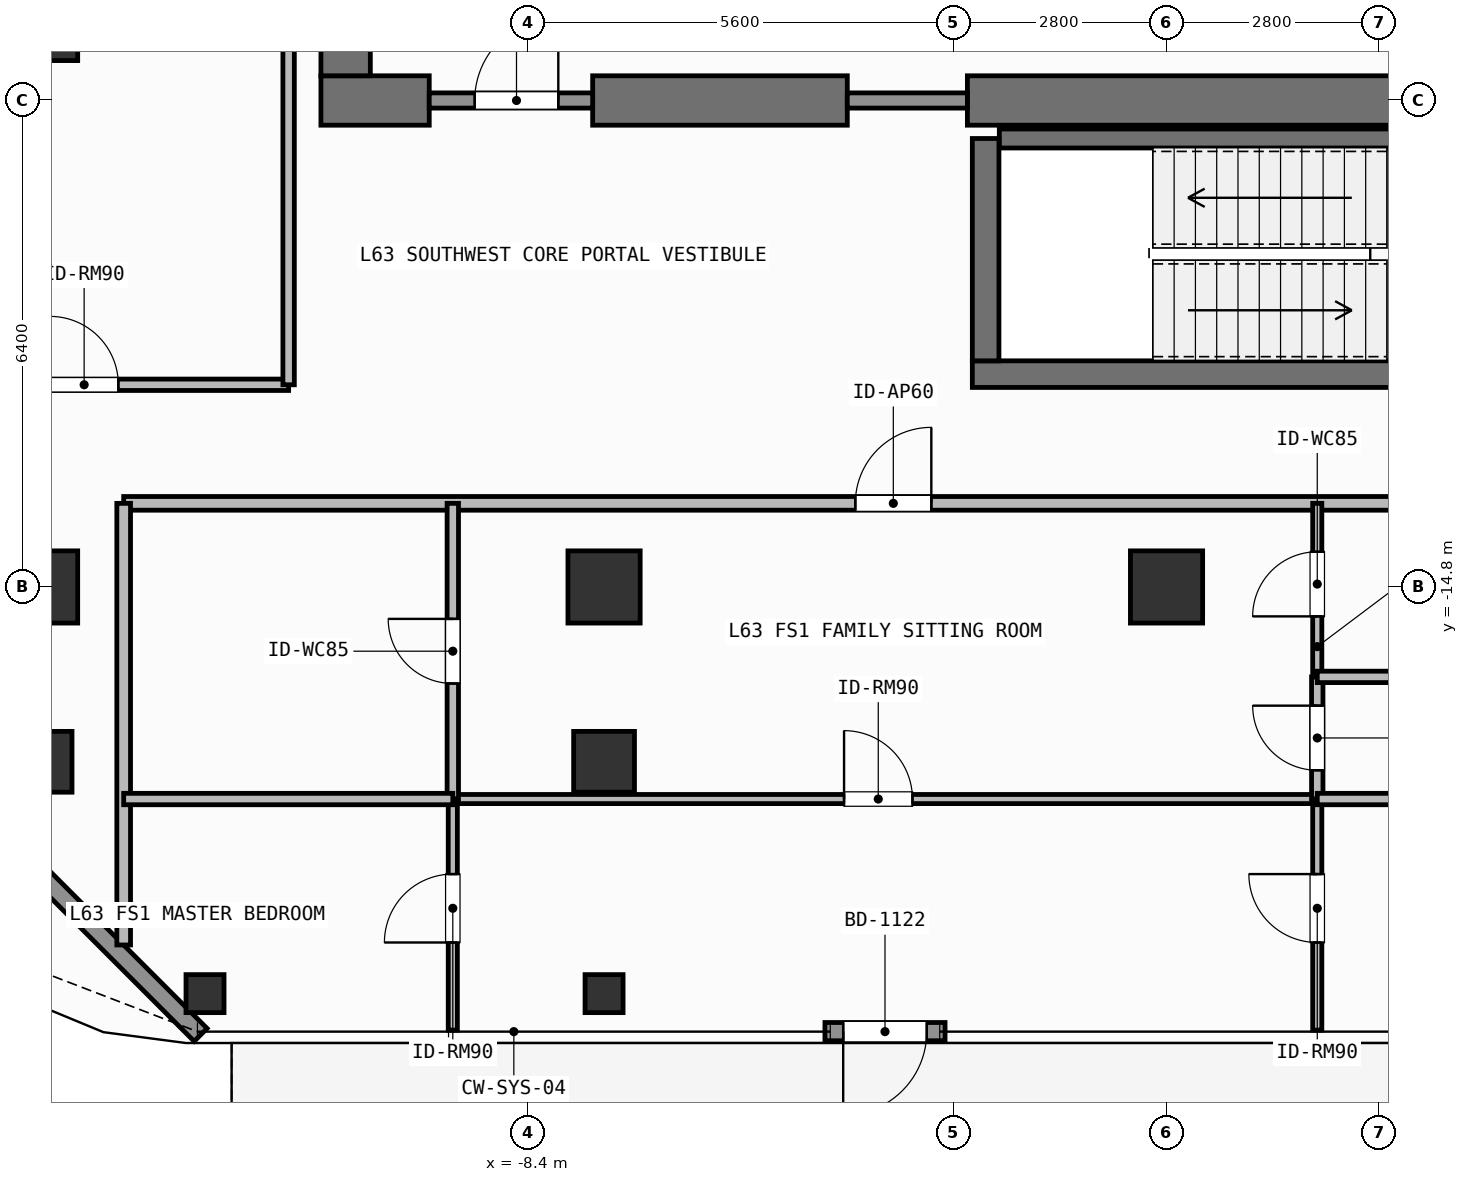
"""IFC4 building model, lengths in metres.
Left out: names, types, materials, properties, quantities, classifications, styles, units other than length and angle.
Written with IfcOpenShell. Run it as: python <this file> out.ifc"""

import sys

from ifc_helpers import new_model, si_unit, direction, frame, frame_2d, origin, origin_2d, place, context, subcontext, project, spatial, rectangle, hollow_rectangle, extrude, element, fill, save


model = new_model("IFC4")
c1 = context("Model", 3, precision=1e-05, world=origin(), true_north=direction((0.0, 1.0)))
c2 = subcontext(c1, "Body", "Model", "MODEL_VIEW")
j1 = project(units=[si_unit("LENGTHUNIT", "METRE"), si_unit("PLANEANGLEUNIT", "RADIAN")], contexts=[c1])
p1 = place(None, origin())
s1 = spatial("IfcSite", under=j1, at=p1, CompositionType="ELEMENT")
p2 = place(p1, origin())
s2 = spatial("IfcBuilding", under=s1, at=p2, CompositionType="ELEMENT")
p3 = place(p2, frame((0.0, 0.0, 258.6)))
s3 = spatial("IfcBuildingStorey", under=s2, at=p3, CompositionType="ELEMENT", Elevation=258.6)
p4 = place(p3, frame((-11.125, -8.4, 0.0), z_axis=(0.0, 0.0, 1.0), x_axis=(1.0, 0.0, 0.0)))
e1 = element("IfcWall", 1, at=p4, inside=s3, PredefinedType="SHEAR", context=c2, shape_type="SweptSolid", body=[
    extrude(rectangle(XDim=1.425, YDim=0.65, at=frame_2d((0.712, 0.0))), origin(), (0.0, 0.0, 1.0), 3.9),
])
p5 = place(p3, frame((-7.55, -8.4, 0.0), z_axis=(0.0, 0.0, 1.0), x_axis=(1.0, 0.0, 0.0)))
e2 = element("IfcWall", 2, at=p5, inside=s3, PredefinedType="SHEAR", context=c2, shape_type="SweptSolid", body=[
    extrude(rectangle(XDim=3.35, YDim=0.65, at=frame_2d((1.675, 0.0))), origin(), (0.0, 0.0, 1.0), 3.9),
])
p6 = place(p3, frame((-2.62, -8.4, 0.0), z_axis=(0.0, 0.0, 1.0), x_axis=(1.0, 0.0, 0.0)))
e3 = element("IfcWall", 3, at=p6, inside=s3, PredefinedType="SHEAR", context=c2, shape_type="SweptSolid", body=[
    extrude(rectangle(XDim=7.27, YDim=0.65, at=frame_2d((3.635, 0.0))), origin(), (0.0, 0.0, 1.0), 3.9),
])
p7 = place(p3, frame((-10.8, -8.075, 0.0), z_axis=(0.0, 0.0, 1.0), x_axis=(0.0, 1.0, 0.0)))
e4 = element("IfcWall", 4, at=p7, inside=s3, PredefinedType="SHEAR", context=c2, shape_type="SweptSolid", body=[
    extrude(rectangle(XDim=16.15, YDim=0.65, at=frame_2d((8.075, 0.0))), origin(), (0.0, 0.0, 1.0), 3.9),
])
p8 = place(p3, frame((-2.555, -12.0, 0.0), z_axis=(0.0, 0.0, 1.0), x_axis=(1.0, 0.0, 0.0)))
e5 = element("IfcWall", 5, at=p8, inside=s3, PredefinedType="SHEAR", context=c2, shape_type="SweptSolid", body=[
    extrude(rectangle(XDim=7.31, YDim=0.35, at=frame_2d((3.655, 0.0))), origin(), (0.0, 0.0, 1.0), 3.9),
])
p9 = place(p3, frame((-2.2, -8.9, 0.0), z_axis=(0.0, 0.0, 1.0), x_axis=(1.0, 0.0, 0.0)))
e6 = element("IfcWall", 6, at=p9, inside=s3, PredefinedType="SHEAR", context=c2, shape_type="SweptSolid", body=[
    extrude(rectangle(XDim=6.6, YDim=0.25, at=frame_2d((3.3, 0.0))), origin(), (0.0, 0.0, 1.0), 3.9),
])
p10 = place(p3, frame((-2.38, -11.825, 0.0), z_axis=(0.0, 0.0, 1.0), x_axis=(0.0, 1.0, 0.0)))
e7 = element("IfcWall", 7, at=p10, inside=s3, PredefinedType="SHEAR", context=c2, shape_type="SweptSolid", body=[
    extrude(rectangle(XDim=2.925, YDim=0.35, at=frame_2d((1.462, 0.0))), origin(), (0.0, 0.0, 1.0), 3.9),
])
for number, where, z_axis, x_axis in (
    (8, (-14.8, -14.8, 0.0), (0.0, 0.0, 1.0), (1.0, 0.0, 0.0)),
    (9, (-7.4, -14.8, 0.0), (0.0, 0.0, 1.0), (1.0, 0.0, 0.0)),
    (10, (0.0, -14.8, 0.0), (0.0, 0.0, 1.0), (1.0, 0.0, 0.0)),
    (11, (-14.8, -7.4, 0.0), (0.0, 0.0, 1.0), (1.0, 0.0, 0.0)),
):
    element("IfcColumn", number, at=place(p3, frame(where, z_axis=z_axis, x_axis=x_axis)), inside=s3, PredefinedType="COLUMN", context=c2, shape_type="SweptSolid", body=[
        extrude(rectangle(XDim=0.95, YDim=0.95, at=origin_2d()), origin(), (0.0, 0.0, 1.0), 3.9),
    ])
for number, where, z_axis, x_axis in (
    (12, (-14.8, -17.1, 0.0), (0.0, 0.0, 1.0), (1.0, 0.0, 0.0)),
    (13, (-7.4, -17.1, 0.0), (0.0, 0.0, 1.0), (1.0, 0.0, 0.0)),
):
    element("IfcColumn", number, at=place(p3, frame(where, z_axis=z_axis, x_axis=x_axis)), inside=s3, PredefinedType="COLUMN", context=c2, shape_type="SweptSolid", body=[
        extrude(hollow_rectangle(XDim=0.8, YDim=0.8, WallThickness=0.036, at=origin_2d()), origin(), (0.0, 0.0, 1.0), 3.9),
    ])
for number, where, z_axis, x_axis in (
    (14, (-12.65, -20.15, 0.0), (0.0, 0.0, 1.0), (1.0, 0.0, 0.0)),
    (15, (-7.4, -20.15, 0.0), (0.0, 0.0, 1.0), (1.0, 0.0, 0.0)),
):
    element("IfcColumn", number, at=place(p3, frame(where, z_axis=z_axis, x_axis=x_axis)), inside=s3, PredefinedType="COLUMN", context=c2, shape_type="SweptSolid", body=[
        extrude(hollow_rectangle(XDim=0.5, YDim=0.5, WallThickness=0.025, at=origin_2d()), origin(), (0.0, 0.0, 1.0), 3.9),
    ])
p11 = place(p3, frame((-2.914, -20.65, 0.0), z_axis=(0.0, 0.0, 1.0), x_axis=(-1.0, 0.0, 0.0)))
e16 = element("IfcWall", 16, at=p11, inside=s3, PredefinedType="SOLIDWALL", context=c2, shape_type="SweptSolid", body=[
    extrude(rectangle(XDim=1.58, YDim=0.24, at=frame_2d((0.79, 0.0))), origin(), (0.0, 0.0, 1.0), 3.68),
])
p12 = place(p11, frame((0.24, 0.0, 0.0)))
e17 = element("IfcOpeningElement", 17, at=p12, cuts=e16, PredefinedType="OPENING", context=c2, shape_type="SweptSolid", body=[
    extrude(rectangle(XDim=1.1, YDim=2.2, at=frame_2d((0.55, 1.1))), frame((0.0, 0.13, 0.0), z_axis=(0.0, -1.0, 0.0), x_axis=(1.0, 0.0, 0.0)), (0.0, 0.0, 1.0), 0.26),
])
p13 = place(p3, frame((-12.708, -20.692, 0.0), z_axis=(0.0, 0.0, 1.0), x_axis=(-0.707126925818, 0.707086635981, 0.0)))
e18 = element("IfcWall", 18, at=p13, inside=s3, PredefinedType="SOLIDWALL", context=c2, shape_type="SweptSolid", body=[
    extrude(rectangle(XDim=6.06, YDim=0.24, at=frame_2d((3.03, 0.0))), origin(), (0.0, 0.0, 1.0), 3.68),
])
p14 = place(p3, frame((-9.7, -8.4, 0.0), z_axis=(0.0, 0.0, 1.0), x_axis=(1.0, 0.0, 0.0)))
e19 = element("IfcWall", 19, at=p14, inside=s3, PredefinedType="SOLIDWALL", context=c2, shape_type="SweptSolid", body=[
    extrude(rectangle(XDim=2.15, YDim=0.2, at=frame_2d((1.075, 0.0))), origin(), (0.0, 0.0, 1.0), 2.92),
])
p15 = place(p14, frame((0.598, 0.0, 0.0)))
e20 = element("IfcOpeningElement", 20, at=p15, cuts=e19, PredefinedType="OPENING", context=c2, shape_type="SweptSolid", body=[
    extrude(rectangle(XDim=1.1, YDim=2.15, at=frame_2d((0.55, 1.075))), frame((0.0, 0.11, 0.0), z_axis=(0.0, -1.0, 0.0), x_axis=(1.0, 0.0, 0.0)), (0.0, 0.0, 1.0), 0.22),
])
p16 = place(p3, frame((-13.72, -13.7, 0.0), z_axis=(0.0, 0.0, 1.0), x_axis=(1.0, 0.0, 0.0)))
e21 = element("IfcWall", 21, at=p16, inside=s3, PredefinedType="PARTITIONING", context=c2, shape_type="SweptSolid", body=[
    extrude(rectangle(XDim=21.144, YDim=0.18, at=frame_2d((10.572, 0.0))), origin(), (0.0, 0.0, 1.0), 3.68),
])
p17 = place(p16, frame((9.625, 0.0, 0.0)))
e22 = element("IfcOpeningElement", 22, at=p17, cuts=e21, PredefinedType="OPENING", context=c2, shape_type="SweptSolid", body=[
    extrude(rectangle(XDim=1.0, YDim=2.2, at=frame_2d((0.5, 1.1))), frame((0.0, 0.1, 0.0), z_axis=(0.0, -1.0, 0.0), x_axis=(1.0, 0.0, 0.0)), (0.0, 0.0, 1.0), 0.2),
])
p18 = place(p3, frame((-9.39, -17.59, 0.0), z_axis=(0.0, 0.0, 1.0), x_axis=(1.0, 0.0, 0.0)))
e23 = element("IfcWall", 23, at=p18, inside=s3, PredefinedType="PARTITIONING", context=c2, shape_type="SweptSolid", body=[
    extrude(rectangle(XDim=11.373, YDim=0.12, at=frame_2d((5.687, 0.0))), origin(), (0.0, 0.0, 1.0), 3.68),
])
p19 = place(p18, frame((5.147, 0.0, 0.0)))
e24 = element("IfcOpeningElement", 24, at=p19, cuts=e23, PredefinedType="OPENING", context=c2, shape_type="SweptSolid", body=[
    extrude(rectangle(XDim=0.9, YDim=2.1, at=frame_2d((0.45, 1.05))), frame((0.0, 0.07, 0.0), z_axis=(0.0, -1.0, 0.0), x_axis=(1.0, 0.0, 0.0)), (0.0, 0.0, 1.0), 0.14),
])
p20 = place(p3, frame((-9.39, -17.59, 0.0), z_axis=(0.0, 0.0, 1.0), x_axis=(0.0, 1.0, 0.0)))
e25 = element("IfcWall", 25, at=p20, inside=s3, PredefinedType="PARTITIONING", context=c2, shape_type="SweptSolid", body=[
    extrude(rectangle(XDim=3.89, YDim=0.15, at=frame_2d((1.945, 0.0))), origin(), (0.0, 0.0, 1.0), 3.68),
])
p21 = place(p20, frame((1.52, 0.0, 0.0)))
e26 = element("IfcOpeningElement", 26, at=p21, cuts=e25, PredefinedType="OPENING", context=c2, shape_type="SweptSolid", body=[
    extrude(rectangle(XDim=0.85, YDim=2.1, at=frame_2d((0.425, 1.05))), frame((0.0, 0.085, 0.0), z_axis=(0.0, -1.0, 0.0), x_axis=(1.0, 0.0, 0.0)), (0.0, 0.0, 1.0), 0.17),
])
p22 = place(p3, frame((-9.39, -20.63, 0.0), z_axis=(0.0, 0.0, 1.0), x_axis=(0.0, 1.0, 0.0)))
e27 = element("IfcWall", 27, at=p22, inside=s3, PredefinedType="PARTITIONING", context=c2, shape_type="SweptSolid", body=[
    extrude(rectangle(XDim=3.04, YDim=0.12, at=frame_2d((1.52, 0.0))), origin(), (0.0, 0.0, 1.0), 3.68),
])
p23 = place(p22, frame((1.153, 0.0, 0.0)))
e28 = element("IfcOpeningElement", 28, at=p23, cuts=e27, PredefinedType="OPENING", context=c2, shape_type="SweptSolid", body=[
    extrude(rectangle(XDim=0.9, YDim=2.1, at=frame_2d((0.45, 1.05))), frame((0.0, 0.07, 0.0), z_axis=(0.0, -1.0, 0.0), x_axis=(1.0, 0.0, 0.0)), (0.0, 0.0, 1.0), 0.14),
])
p24 = place(p3, frame((1.983, -17.59, 0.0), z_axis=(0.0, 0.0, 1.0), x_axis=(0.0, 1.0, 0.0)))
e29 = element("IfcWall", 29, at=p24, inside=s3, PredefinedType="PARTITIONING", context=c2, shape_type="SweptSolid", body=[
    extrude(rectangle(XDim=1.607, YDim=0.15, at=frame_2d((0.804, 0.0))), origin(), (0.0, 0.0, 1.0), 3.68),
])
p25 = place(p24, frame((0.378, 0.0, 0.0)))
e30 = element("IfcOpeningElement", 30, at=p25, cuts=e29, PredefinedType="OPENING", context=c2, shape_type="SweptSolid", body=[
    extrude(rectangle(XDim=0.85, YDim=2.1, at=frame_2d((0.425, 1.05))), frame((0.0, 0.085, 0.0), z_axis=(0.0, -1.0, 0.0), x_axis=(1.0, 0.0, 0.0)), (0.0, 0.0, 1.0), 0.17),
])
p26 = place(p3, frame((1.983, -15.983, 0.0), z_axis=(0.0, 0.0, 1.0), x_axis=(0.0, 1.0, 0.0)))
e31 = element("IfcWall", 31, at=p26, inside=s3, PredefinedType="PARTITIONING", context=c2, shape_type="SweptSolid", body=[
    extrude(rectangle(XDim=2.283, YDim=0.12, at=frame_2d((1.142, 0.0))), origin(), (0.0, 0.0, 1.0), 3.68),
])
p27 = place(p26, frame((0.796, 0.0, 0.0)))
e32 = element("IfcOpeningElement", 32, at=p27, cuts=e31, PredefinedType="OPENING", context=c2, shape_type="SweptSolid", body=[
    extrude(rectangle(XDim=0.85, YDim=2.1, at=frame_2d((0.425, 1.05))), frame((0.0, 0.07, 0.0), z_axis=(0.0, -1.0, 0.0), x_axis=(1.0, 0.0, 0.0)), (0.0, 0.0, 1.0), 0.14),
])
p28 = place(p3, frame((1.983, -20.63, 0.0), z_axis=(0.0, 0.0, 1.0), x_axis=(0.0, 1.0, 0.0)))
e33 = element("IfcWall", 33, at=p28, inside=s3, PredefinedType="PARTITIONING", context=c2, shape_type="SweptSolid", body=[
    extrude(rectangle(XDim=3.04, YDim=0.12, at=frame_2d((1.52, 0.0))), origin(), (0.0, 0.0, 1.0), 3.68),
])
p29 = place(p28, frame((1.153, 0.0, 0.0)))
e34 = element("IfcOpeningElement", 34, at=p29, cuts=e33, PredefinedType="OPENING", context=c2, shape_type="SweptSolid", body=[
    extrude(rectangle(XDim=0.9, YDim=2.1, at=frame_2d((0.45, 1.05))), frame((0.0, 0.07, 0.0), z_axis=(0.0, -1.0, 0.0), x_axis=(1.0, 0.0, 0.0)), (0.0, 0.0, 1.0), 0.14),
])
p30 = place(p3, frame((-16.93, -12.14, 0.0), z_axis=(0.0, 0.0, 1.0), x_axis=(1.0, 0.0, 0.0)))
e35 = element("IfcWall", 35, at=p30, inside=s3, PredefinedType="PARTITIONING", context=c2, shape_type="SweptSolid", body=[
    extrude(rectangle(XDim=5.38, YDim=0.15, at=frame_2d((2.69, 0.0))), origin(), (0.0, 0.0, 1.0), 3.68),
])
p31 = place(p30, frame((2.24, 0.0, 0.0)))
e36 = element("IfcOpeningElement", 36, at=p31, cuts=e35, PredefinedType="OPENING", context=c2, shape_type="SweptSolid", body=[
    extrude(rectangle(XDim=0.9, YDim=2.1, at=frame_2d((0.45, 1.05))), frame((0.0, 0.085, 0.0), z_axis=(0.0, -1.0, 0.0), x_axis=(1.0, 0.0, 0.0)), (0.0, 0.0, 1.0), 0.17),
])
p32 = place(p3, frame((-4.2, -8.4, 0.0), z_axis=(0.0, 0.0, 1.0), x_axis=(1.0, 0.0, 0.0)))
e37 = element("IfcWall", 37, at=p32, inside=s3, PredefinedType="SOLIDWALL", context=c2, shape_type="SweptSolid", body=[
    extrude(rectangle(XDim=1.58, YDim=0.2, at=frame_2d((0.79, 0.0))), origin(), (0.0, 0.0, 1.0), 2.92),
])
p33 = place(p3, frame((-13.72, -19.51, 0.0), z_axis=(0.0, 0.0, 1.0), x_axis=(0.0, 1.0, 0.0)))
e38 = element("IfcWall", 38, at=p33, inside=s3, PredefinedType="PARTITIONING", context=c2, shape_type="SweptSolid", body=[
    extrude(rectangle(XDim=5.81, YDim=0.18, at=frame_2d((2.905, 0.0))), origin(), (0.0, 0.0, 1.0), 3.68),
])
p34 = place(p3, frame((-13.72, -17.59, 0.0), z_axis=(0.0, 0.0, 1.0), x_axis=(1.0, 0.0, 0.0)))
e39 = element("IfcWall", 39, at=p34, inside=s3, PredefinedType="PARTITIONING", context=c2, shape_type="SweptSolid", body=[
    extrude(rectangle(XDim=4.33, YDim=0.15, at=frame_2d((2.165, 0.0))), origin(), (0.0, 0.0, 1.0), 3.68),
])
for number, where, z_axis, x_axis in (
    (40, (1.983, -15.983, 0.0), (0.0, 0.0, 1.0), (1.0, 0.0, 0.0)),
    (41, (1.983, -17.59, 0.0), (0.0, 0.0, 1.0), (1.0, 0.0, 0.0)),
):
    element("IfcWall", number, at=place(p3, frame(where, z_axis=z_axis, x_axis=x_axis)), inside=s3, PredefinedType="PARTITIONING", context=c2, shape_type="SweptSolid", body=[
        extrude(rectangle(XDim=5.441, YDim=0.15, at=frame_2d((2.721, 0.0))), origin(), (0.0, 0.0, 1.0), 3.68),
    ])
p35 = place(p3, frame((-11.55, -12.14, 0.0), z_axis=(0.0, 0.0, 1.0), x_axis=(0.0, 1.0, 0.0)))
e42 = element("IfcWall", 42, at=p35, inside=s3, PredefinedType="PARTITIONING", context=c2, shape_type="SweptSolid", body=[
    extrude(rectangle(XDim=13.94, YDim=0.15, at=frame_2d((6.97, 0.0))), origin(), (0.0, 0.0, 1.0), 3.68),
])
p36 = place(p12, origin())
e43 = element("IfcDoor", 43, at=p36, inside=s3, OperationType="SINGLE_SWING_RIGHT", PredefinedType="DOOR", context=c2, shape_type="SweptSolid", body=[
    extrude(rectangle(XDim=1.1, YDim=2.2, at=frame_2d((0.55, 1.1))), frame((0.0, 0.025, 0.0), z_axis=(0.0, -1.0, 0.0), x_axis=(1.0, 0.0, 0.0)), (0.0, 0.0, 1.0), 0.05),
])
fill(e17, e43)
p37 = place(p15, origin())
e44 = element("IfcDoor", 44, at=p37, inside=s3, OperationType="SINGLE_SWING_RIGHT", PredefinedType="DOOR", context=c2, shape_type="SweptSolid", body=[
    extrude(rectangle(XDim=1.1, YDim=2.15, at=frame_2d((0.55, 1.075))), frame((0.0, 0.025, 0.0), z_axis=(0.0, -1.0, 0.0), x_axis=(1.0, 0.0, 0.0)), (0.0, 0.0, 1.0), 0.05),
])
fill(e20, e44)
p38 = place(p17, origin())
e45 = element("IfcDoor", 45, at=p38, inside=s3, OperationType="SINGLE_SWING_RIGHT", PredefinedType="DOOR", context=c2, shape_type="SweptSolid", body=[
    extrude(rectangle(XDim=1.0, YDim=2.2, at=frame_2d((0.5, 1.1))), frame((0.0, 0.025, 0.0), z_axis=(0.0, -1.0, 0.0), x_axis=(1.0, 0.0, 0.0)), (0.0, 0.0, 1.0), 0.05),
])
fill(e22, e45)
p39 = place(p19, origin())
e46 = element("IfcDoor", 46, at=p39, inside=s3, OperationType="SINGLE_SWING_LEFT", PredefinedType="DOOR", context=c2, shape_type="SweptSolid", body=[
    extrude(rectangle(XDim=0.9, YDim=2.1, at=frame_2d((0.45, 1.05))), frame((0.0, 0.025, 0.0), z_axis=(0.0, -1.0, 0.0), x_axis=(1.0, 0.0, 0.0)), (0.0, 0.0, 1.0), 0.05),
])
fill(e24, e46)
p40 = place(p21, origin())
e47 = element("IfcDoor", 47, at=p40, inside=s3, OperationType="SINGLE_SWING_RIGHT", PredefinedType="DOOR", context=c2, shape_type="SweptSolid", body=[
    extrude(rectangle(XDim=0.85, YDim=2.1, at=frame_2d((0.425, 1.05))), frame((0.0, 0.025, 0.0), z_axis=(0.0, -1.0, 0.0), x_axis=(1.0, 0.0, 0.0)), (0.0, 0.0, 1.0), 0.05),
])
fill(e26, e47)
p41 = place(p23, origin())
e48 = element("IfcDoor", 48, at=p41, inside=s3, OperationType="SINGLE_SWING_LEFT", PredefinedType="DOOR", context=c2, shape_type="SweptSolid", body=[
    extrude(rectangle(XDim=0.9, YDim=2.1, at=frame_2d((0.45, 1.05))), frame((0.0, 0.025, 0.0), z_axis=(0.0, -1.0, 0.0), x_axis=(1.0, 0.0, 0.0)), (0.0, 0.0, 1.0), 0.05),
])
fill(e28, e48)
p42 = place(p25, origin())
e49 = element("IfcDoor", 49, at=p42, inside=s3, OperationType="SINGLE_SWING_RIGHT", PredefinedType="DOOR", context=c2, shape_type="SweptSolid", body=[
    extrude(rectangle(XDim=0.85, YDim=2.1, at=frame_2d((0.425, 1.05))), frame((0.0, 0.025, 0.0), z_axis=(0.0, -1.0, 0.0), x_axis=(1.0, 0.0, 0.0)), (0.0, 0.0, 1.0), 0.05),
])
fill(e30, e49)
p43 = place(p27, origin())
e50 = element("IfcDoor", 50, at=p43, inside=s3, OperationType="SINGLE_SWING_LEFT", PredefinedType="DOOR", context=c2, shape_type="SweptSolid", body=[
    extrude(rectangle(XDim=0.85, YDim=2.1, at=frame_2d((0.425, 1.05))), frame((0.0, 0.025, 0.0), z_axis=(0.0, -1.0, 0.0), x_axis=(1.0, 0.0, 0.0)), (0.0, 0.0, 1.0), 0.05),
])
fill(e32, e50)
p44 = place(p29, origin())
e51 = element("IfcDoor", 51, at=p44, inside=s3, OperationType="SINGLE_SWING_RIGHT", PredefinedType="DOOR", context=c2, shape_type="SweptSolid", body=[
    extrude(rectangle(XDim=0.9, YDim=2.1, at=frame_2d((0.45, 1.05))), frame((0.0, 0.025, 0.0), z_axis=(0.0, -1.0, 0.0), x_axis=(1.0, 0.0, 0.0)), (0.0, 0.0, 1.0), 0.05),
])
fill(e34, e51)
p45 = place(p31, origin())
e52 = element("IfcDoor", 52, at=p45, inside=s3, OperationType="SINGLE_SWING_LEFT", PredefinedType="DOOR", context=c2, shape_type="SweptSolid", body=[
    extrude(rectangle(XDim=0.9, YDim=2.1, at=frame_2d((0.45, 1.05))), frame((0.0, 0.025, 0.0), z_axis=(0.0, -1.0, 0.0), x_axis=(1.0, 0.0, 0.0)), (0.0, 0.0, 1.0), 0.05),
])
fill(e36, e52)
save(model, sys.argv[1])
